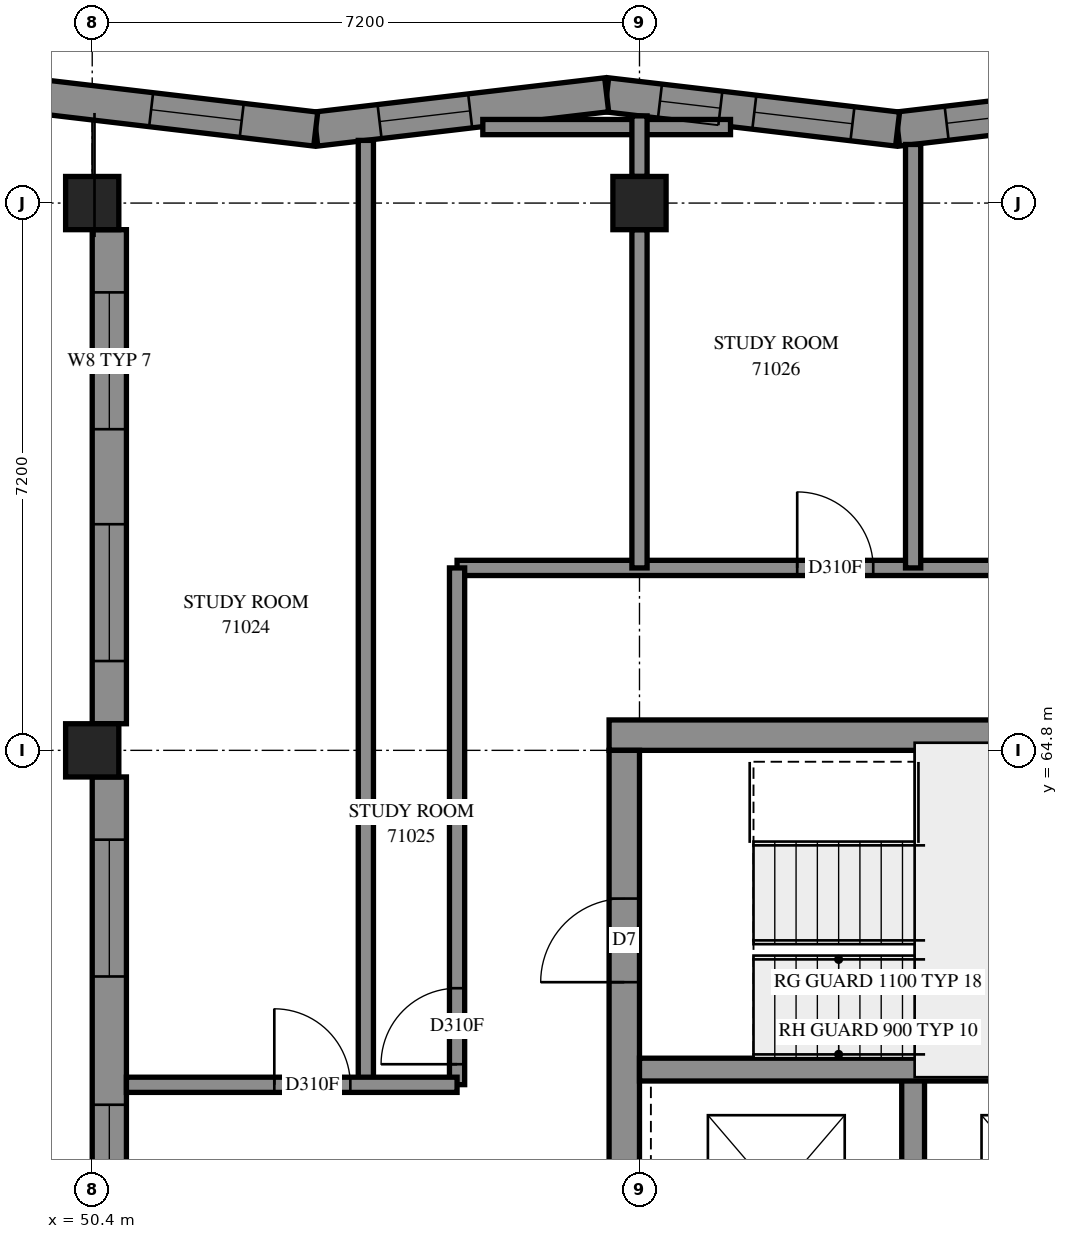
"""IFC4 building model, lengths in metres.
Left out: names, types, materials, properties, quantities, classifications, styles, units other than length and angle.
Written with IfcOpenShell. Run it as: python <this file> out.ifc"""

import sys

from ifc_helpers import new_model, si_unit, direction, frame, frame_2d, origin, origin_2d, place, context, subcontext, project, spatial, polyline, rectangle, outline, extrude, element, fill, save


model = new_model("IFC4")
c1 = context("Model", 3, precision=1e-05, world=origin(), true_north=direction((0.0, 1.0)))
c2 = subcontext(c1, "Body", "Model", "MODEL_VIEW")
j1 = project(units=[si_unit("LENGTHUNIT", "METRE"), si_unit("PLANEANGLEUNIT", "RADIAN")], contexts=[c1])
p1 = place(None, origin())
s1 = spatial("IfcSite", under=j1, at=p1, CompositionType="ELEMENT")
p2 = place(p1, origin())
s2 = spatial("IfcBuilding", under=s1, at=p2, CompositionType="ELEMENT")
p3 = place(p2, frame((0.0, 0.0, 260.8)))
s3 = spatial("IfcBuildingStorey", under=s2, at=p3, CompositionType="ELEMENT", Elevation=260.8)
for number, where, z_axis, x_axis in (
    (1, (50.4, 64.8, 0.0), (0.0, 0.0, 1.0), (1.0, 0.0, 0.0)),
    (2, (50.4, 72.0, 0.0), (0.0, 0.0, 1.0), (1.0, 0.0, 0.0)),
    (3, (57.6, 72.0, 0.0), (0.0, 0.0, 1.0), (1.0, 0.0, 0.0)),
):
    element("IfcColumn", number, at=place(p3, frame(where, z_axis=z_axis, x_axis=x_axis)), inside=s3, PredefinedType="COLUMN", context=c2, shape_type="SweptSolid", body=[
        extrude(rectangle(XDim=0.7, YDim=0.7, at=origin_2d()), origin(), (0.0, 0.0, 1.0), 3.1),
    ])
p4 = place(p3, frame((57.2, 65.0, -0.3), z_axis=(0.0, 0.0, 1.0), x_axis=(1.0, 0.0, 0.0)))
e4 = element("IfcWall", 4, at=p4, inside=s3, PredefinedType="SHEAR", context=c2, shape_type="SweptSolid", body=[
    extrude(rectangle(XDim=15.2, YDim=0.4, at=frame_2d((7.6, 0.0))), origin(), (0.0, 0.0, 1.0), 2.7),
])
p5 = place(p4, frame((10.4, 0.0, 0.3)))
e5 = element("IfcOpeningElement", 5, at=p5, cuts=e4, PredefinedType="OPENING", context=c2, shape_type="SweptSolid", body=[
    extrude(rectangle(XDim=0.8, YDim=2.1, at=frame_2d((0.4, 1.05))), frame((0.0, 0.21, 0.0), z_axis=(0.0, -1.0, 0.0), x_axis=(1.0, 0.0, 0.0)), (0.0, 0.0, 1.0), 0.42),
])
p6 = place(p3, frame((57.4, 50.4, -0.3), z_axis=(0.0, 0.0, 1.0), x_axis=(0.0, 1.0, 0.0)))
e6 = element("IfcWall", 6, at=p6, inside=s3, PredefinedType="SHEAR", context=c2, shape_type="SweptSolid", body=[
    extrude(rectangle(XDim=14.4, YDim=0.4, at=frame_2d((7.2, 0.0))), origin(), (0.0, 0.0, 1.0), 2.7),
])
p7 = place(p6, frame((4.55, 0.0, 0.3)))
e7 = element("IfcOpeningElement", 7, at=p7, cuts=e6, PredefinedType="OPENING", context=c2, shape_type="SweptSolid", body=[
    extrude(rectangle(XDim=1.1, YDim=2.1, at=frame_2d((0.55, 1.05))), frame((0.0, 0.21, 0.0), z_axis=(0.0, -1.0, 0.0), x_axis=(1.0, 0.0, 0.0)), (0.0, 0.0, 1.0), 0.42),
])
p8 = place(p6, frame((11.35, 0.0, 0.3)))
e8 = element("IfcOpeningElement", 8, at=p8, cuts=e6, PredefinedType="OPENING", context=c2, shape_type="SweptSolid", body=[
    extrude(rectangle(XDim=1.1, YDim=2.1, at=frame_2d((0.55, 1.05))), frame((0.0, 0.21, 0.0), z_axis=(0.0, -1.0, 0.0), x_axis=(1.0, 0.0, 0.0)), (0.0, 0.0, 1.0), 0.42),
])
p9 = place(p3, frame((61.2, 57.3, 0.0), z_axis=(0.0, 0.0, 1.0), x_axis=(0.0, 1.0, 0.0)))
e9 = element("IfcWall", 9, at=p9, inside=s3, PredefinedType="SOLIDWALL", context=c2, shape_type="SweptSolid", body=[
    extrude(rectangle(XDim=3.3, YDim=0.3, at=frame_2d((1.65, 0.0))), origin(), (0.0, 0.0, 1.0), 3.1),
])
p10 = place(p3, frame((57.6, 60.6, 0.0), z_axis=(0.0, 0.0, 1.0), x_axis=(1.0, 0.0, 0.0)))
e10 = element("IfcWall", 10, at=p10, inside=s3, PredefinedType="SOLIDWALL", context=c2, shape_type="SweptSolid", body=[
    extrude(rectangle(XDim=7.2, YDim=0.3, at=frame_2d((3.6, 0.0))), origin(), (0.0, 0.0, 1.0), 3.1),
])
p11 = place(p3, frame((64.823, 73.424, 0.0), z_axis=(0.0, 0.0, 1.0), x_axis=(-0.9931289789, -0.1170249176, 0.0)))
e11 = element("IfcWall", 11, at=p11, inside=s3, PredefinedType="SOLIDWALL", context=c2, shape_type="SweptSolid", body=[
    extrude(outline(polyline([(-0.026, -0.225), (3.827, -0.225), (3.88, 0.225), (0.026, 0.225), (-0.026, -0.225)])), origin(), (0.0, 0.0, 1.0), 3.1),
])
p12 = place(p11, frame((0.554, 0.0, 0.45)))
e12 = element("IfcOpeningElement", 12, at=p12, cuts=e11, PredefinedType="OPENING", context=c2, shape_type="SweptSolid", body=[
    extrude(rectangle(XDim=1.0, YDim=2.5, at=frame_2d((0.5, 1.25))), frame((0.0, 0.235, 0.0), z_axis=(0.0, -1.0, 0.0), x_axis=(1.0, 0.0, 0.0)), (0.0, 0.0, 1.0), 0.47),
])
p13 = place(p11, frame((1.904, 0.0, 0.45)))
e13 = element("IfcOpeningElement", 13, at=p13, cuts=e11, PredefinedType="OPENING", context=c2, shape_type="SweptSolid", body=[
    extrude(rectangle(XDim=1.3, YDim=2.5, at=frame_2d((0.65, 1.25))), frame((0.0, 0.235, 0.0), z_axis=(0.0, -1.0, 0.0), x_axis=(1.0, 0.0, 0.0)), (0.0, 0.0, 1.0), 0.47),
])
p14 = place(p3, frame((60.995, 72.973, 0.0), z_axis=(0.0, 0.0, 1.0), x_axis=(-0.9931289789, 0.1170249176, 0.0)))
e14 = element("IfcWall", 14, at=p14, inside=s3, PredefinedType="SOLIDWALL", context=c2, shape_type="SweptSolid", body=[
    extrude(outline(polyline([(0.026, -0.225), (3.88, -0.225), (3.827, 0.225), (-0.026, 0.225), (0.026, -0.225)])), origin(), (0.0, 0.0, 1.0), 3.1),
])
p15 = place(p14, frame((0.598, 0.0, 0.45)))
e15 = element("IfcOpeningElement", 15, at=p15, cuts=e14, PredefinedType="OPENING", context=c2, shape_type="SweptSolid", body=[
    extrude(rectangle(XDim=1.3, YDim=2.5, at=frame_2d((0.65, 1.25))), frame((0.0, 0.235, 0.0), z_axis=(0.0, -1.0, 0.0), x_axis=(1.0, 0.0, 0.0)), (0.0, 0.0, 1.0), 0.47),
])
p16 = place(p14, frame((2.348, 0.0, 0.45)))
e16 = element("IfcOpeningElement", 16, at=p16, cuts=e14, PredefinedType="OPENING", context=c2, shape_type="SweptSolid", body=[
    extrude(rectangle(XDim=0.8, YDim=2.5, at=frame_2d((0.4, 1.25))), frame((0.0, 0.235, 0.0), z_axis=(0.0, -1.0, 0.0), x_axis=(1.0, 0.0, 0.0)), (0.0, 0.0, 1.0), 0.47),
])
p17 = place(p3, frame((57.168, 73.424, 0.0), z_axis=(0.0, 0.0, 1.0), x_axis=(-0.9931289789, -0.1170249176, 0.0)))
e17 = element("IfcWall", 17, at=p17, inside=s3, PredefinedType="SOLIDWALL", context=c2, shape_type="SweptSolid", body=[
    extrude(outline(polyline([(-0.026, -0.225), (3.827, -0.225), (3.88, 0.225), (0.026, 0.225), (-0.026, -0.225)])), origin(), (0.0, 0.0, 1.0), 3.1),
])
p18 = place(p17, frame((1.808, 0.0, 0.45)))
e18 = element("IfcOpeningElement", 18, at=p18, cuts=e17, PredefinedType="OPENING", context=c2, shape_type="SweptSolid", body=[
    extrude(rectangle(XDim=1.2, YDim=2.55, at=frame_2d((0.6, 1.275))), frame((0.0, 0.235, 0.0), z_axis=(0.0, -1.0, 0.0), x_axis=(1.0, 0.0, 0.0)), (0.0, 0.0, 1.0), 0.47),
])
p19 = place(p3, frame((53.341, 72.973, 0.0), z_axis=(0.0, 0.0, 1.0), x_axis=(-0.9931289789, 0.1170249176, 0.0)))
e19 = element("IfcWall", 19, at=p19, inside=s3, PredefinedType="SOLIDWALL", context=c2, shape_type="SweptSolid", body=[
    extrude(outline(polyline([(0.026, -0.225), (3.88, -0.225), (3.827, 0.225), (-0.026, 0.225), (0.026, -0.225)])), origin(), (0.0, 0.0, 1.0), 3.1),
])
p20 = place(p19, frame((0.981, 0.0, 0.45)))
e20 = element("IfcOpeningElement", 20, at=p20, cuts=e19, PredefinedType="OPENING", context=c2, shape_type="SweptSolid", body=[
    extrude(rectangle(XDim=1.2, YDim=2.55, at=frame_2d((0.6, 1.275))), frame((0.0, 0.235, 0.0), z_axis=(0.0, -1.0, 0.0), x_axis=(1.0, 0.0, 0.0)), (0.0, 0.0, 1.0), 0.47),
])
p21 = place(p3, frame((50.625, 71.65, 0.0), z_axis=(0.0, 0.0, 1.0), x_axis=(0.0, -1.0, 0.0)))
e21 = element("IfcWall", 21, at=p21, inside=s3, PredefinedType="SOLIDWALL", context=c2, shape_type="SweptSolid", body=[
    extrude(rectangle(XDim=6.5, YDim=0.45, at=frame_2d((3.25, 0.0))), origin(), (0.0, 0.0, 1.0), 3.1),
])
p22 = place(p21, frame((0.825, 0.0, 0.7)))
e22 = element("IfcOpeningElement", 22, at=p22, cuts=e21, PredefinedType="OPENING", context=c2, shape_type="SweptSolid", body=[
    extrude(rectangle(XDim=1.8, YDim=1.8, at=frame_2d((0.9, 0.9))), frame((0.0, 0.235, 0.0), z_axis=(0.0, -1.0, 0.0), x_axis=(1.0, 0.0, 0.0)), (0.0, 0.0, 1.0), 0.47),
])
p23 = place(p21, frame((3.875, 0.0, 0.7)))
e23 = element("IfcOpeningElement", 23, at=p23, cuts=e21, PredefinedType="OPENING", context=c2, shape_type="SweptSolid", body=[
    extrude(rectangle(XDim=1.8, YDim=1.8, at=frame_2d((0.9, 0.9))), frame((0.0, 0.235, 0.0), z_axis=(0.0, -1.0, 0.0), x_axis=(1.0, 0.0, 0.0)), (0.0, 0.0, 1.0), 0.47),
])
p24 = place(p3, frame((50.625, 64.45, 0.0), z_axis=(0.0, 0.0, 1.0), x_axis=(0.0, -1.0, 0.0)))
e24 = element("IfcWall", 24, at=p24, inside=s3, PredefinedType="SOLIDWALL", context=c2, shape_type="SweptSolid", body=[
    extrude(rectangle(XDim=6.5, YDim=0.45, at=frame_2d((3.25, 0.0))), origin(), (0.0, 0.0, 1.0), 3.1),
])
p25 = place(p24, frame((0.825, 0.0, 0.7)))
e25 = element("IfcOpeningElement", 25, at=p25, cuts=e24, PredefinedType="OPENING", context=c2, shape_type="SweptSolid", body=[
    extrude(rectangle(XDim=1.8, YDim=1.8, at=frame_2d((0.9, 0.9))), frame((0.0, 0.235, 0.0), z_axis=(0.0, -1.0, 0.0), x_axis=(1.0, 0.0, 0.0)), (0.0, 0.0, 1.0), 0.47),
])
p26 = place(p24, frame((4.312, 0.0, 0.6)))
e26 = element("IfcOpeningElement", 26, at=p26, cuts=e24, PredefinedType="OPENING", context=c2, shape_type="SweptSolid", body=[
    extrude(rectangle(XDim=1.2, YDim=1.9, at=frame_2d((0.6, 0.95))), frame((0.0, 0.235, 0.0), z_axis=(0.0, -1.0, 0.0), x_axis=(1.0, 0.0, 0.0)), (0.0, 0.0, 1.0), 0.47),
])
p27 = place(p3, frame((55.2, 67.2, 0.0), z_axis=(0.0, 0.0, 1.0), x_axis=(1.0, 0.0, 0.0)))
e27 = element("IfcWall", 27, at=p27, inside=s3, PredefinedType="PARTITIONING", context=c2, shape_type="SweptSolid", body=[
    extrude(rectangle(XDim=19.2, YDim=0.2, at=frame_2d((9.6, 0.0))), origin(), (0.0, 0.0, 1.0), 3.1),
])
p28 = place(p27, frame((4.475, 0.0, 0.0)))
e28 = element("IfcOpeningElement", 28, at=p28, cuts=e27, PredefinedType="OPENING", context=c2, shape_type="SweptSolid", body=[
    extrude(rectangle(XDim=1.0, YDim=2.1, at=frame_2d((0.5, 1.05))), frame((0.0, 0.11, 0.0), z_axis=(0.0, -1.0, 0.0), x_axis=(1.0, 0.0, 0.0)), (0.0, 0.0, 1.0), 0.22),
])
p29 = place(p27, frame((8.301, 0.0, 0.0)))
e29 = element("IfcOpeningElement", 29, at=p29, cuts=e27, PredefinedType="OPENING", context=c2, shape_type="SweptSolid", body=[
    extrude(rectangle(XDim=0.9, YDim=2.1, at=frame_2d((0.45, 1.05))), frame((0.0, 0.11, 0.0), z_axis=(0.0, -1.0, 0.0), x_axis=(1.0, 0.0, 0.0)), (0.0, 0.0, 1.0), 0.22),
])
p30 = place(p27, frame((13.88, 0.0, 0.0)))
e30 = element("IfcOpeningElement", 30, at=p30, cuts=e27, PredefinedType="OPENING", context=c2, shape_type="SweptSolid", body=[
    extrude(rectangle(XDim=1.0, YDim=2.1, at=frame_2d((0.5, 1.05))), frame((0.0, 0.11, 0.0), z_axis=(0.0, -1.0, 0.0), x_axis=(1.0, 0.0, 0.0)), (0.0, 0.0, 1.0), 0.22),
])
p31 = place(p3, frame((54.0, 60.4, 0.0), z_axis=(0.0, 0.0, 1.0), x_axis=(0.0, 1.0, 0.0)))
e31 = element("IfcWall", 31, at=p31, inside=s3, PredefinedType="PARTITIONING", context=c2, shape_type="SweptSolid", body=[
    extrude(rectangle(XDim=12.425, YDim=0.2, at=frame_2d((6.212, 0.0))), origin(), (0.0, 0.0, 1.0), 3.1),
])
p32 = place(p3, frame((55.2, 60.402, 0.0), z_axis=(0.0, 0.0, 1.0), x_axis=(0.0, 1.0, 0.0)))
e32 = element("IfcWall", 32, at=p32, inside=s3, PredefinedType="PARTITIONING", context=c2, shape_type="SweptSolid", body=[
    extrude(rectangle(XDim=6.798, YDim=0.2, at=frame_2d((3.399, 0.0))), origin(), (0.0, 0.0, 1.0), 3.1),
])
p33 = place(p32, frame((0.269, 0.0, 0.0)))
e33 = element("IfcOpeningElement", 33, at=p33, cuts=e32, PredefinedType="OPENING", context=c2, shape_type="SweptSolid", body=[
    extrude(rectangle(XDim=1.0, YDim=2.1, at=frame_2d((0.5, 1.05))), frame((0.0, 0.11, 0.0), z_axis=(0.0, -1.0, 0.0), x_axis=(1.0, 0.0, 0.0)), (0.0, 0.0, 1.0), 0.22),
])
p34 = place(p3, frame((61.2, 67.2, 0.0), z_axis=(0.0, 0.0, 1.0), x_axis=(0.0, 1.0, 0.0)))
e34 = element("IfcWall", 34, at=p34, inside=s3, PredefinedType="PARTITIONING", context=c2, shape_type="SweptSolid", body=[
    extrude(rectangle(XDim=5.571, YDim=0.2, at=frame_2d((2.785, 0.0))), origin(), (0.0, 0.0, 1.0), 3.1),
])
p35 = place(p3, frame((57.6, 67.2, 0.0), z_axis=(0.0, 0.0, 1.0), x_axis=(0.0, 1.0, 0.0)))
e35 = element("IfcWall", 35, at=p35, inside=s3, PredefinedType="PARTITIONING", context=c2, shape_type="SweptSolid", body=[
    extrude(rectangle(XDim=4.45, YDim=0.2, at=frame_2d((2.225, 0.0))), origin(), (0.0, 0.0, 1.0), 3.1),
])
p36 = place(p3, frame((50.85, 60.4, 0.0), z_axis=(0.0, 0.0, 1.0), x_axis=(1.0, 0.0, 0.0)))
e36 = element("IfcWall", 36, at=p36, inside=s3, PredefinedType="PARTITIONING", context=c2, shape_type="SweptSolid", body=[
    extrude(rectangle(XDim=4.35, YDim=0.2, at=frame_2d((2.175, 0.0))), origin(), (0.0, 0.0, 1.0), 3.1),
])
p37 = place(p36, frame((1.946, 0.0, 0.0)))
e37 = element("IfcOpeningElement", 37, at=p37, cuts=e36, PredefinedType="OPENING", context=c2, shape_type="SweptSolid", body=[
    extrude(rectangle(XDim=1.0, YDim=2.1, at=frame_2d((0.5, 1.05))), frame((0.0, 0.11, 0.0), z_axis=(0.0, -1.0, 0.0), x_axis=(1.0, 0.0, 0.0)), (0.0, 0.0, 1.0), 0.22),
])
p38 = place(p3, frame((55.539, 73.0, 0.0), z_axis=(0.0, 0.0, 1.0), x_axis=(1.0, 0.0, 0.0)))
e38 = element("IfcWall", 38, at=p38, inside=s3, PredefinedType="PARTITIONING", context=c2, shape_type="SweptSolid", body=[
    extrude(rectangle(XDim=3.259, YDim=0.2, at=frame_2d((1.629, 0.0))), origin(), (0.0, 0.0, 1.0), 3.1),
])
p39 = place(p3, frame((57.6, 72.35, 0.0), z_axis=(0.0, 0.0, 1.0), x_axis=(0.0, 1.0, 0.0)))
e39 = element("IfcWall", 39, at=p39, inside=s3, PredefinedType="PARTITIONING", context=c2, shape_type="SweptSolid", body=[
    extrude(rectangle(XDim=0.797, YDim=0.2, at=frame_2d((0.399, 0.0))), origin(), (0.0, 0.0, 1.0), 3.1),
])
p40 = place(p18, origin())
e40 = element("IfcWindow", 40, at=p40, inside=s3, PartitioningType="SINGLE_PANEL", PredefinedType="WINDOW", context=c2, shape_type="SweptSolid", body=[
    extrude(rectangle(XDim=1.2, YDim=2.55, at=frame_2d((0.6, 1.275))), frame((0.0, 0.205, 0.0), z_axis=(0.0, -1.0, 0.0), x_axis=(1.0, 0.0, 0.0)), (0.0, 0.0, 1.0), 0.06),
])
fill(e18, e40)
p41 = place(p20, origin())
e41 = element("IfcWindow", 41, at=p41, inside=s3, PartitioningType="SINGLE_PANEL", PredefinedType="WINDOW", context=c2, shape_type="SweptSolid", body=[
    extrude(rectangle(XDim=1.2, YDim=2.55, at=frame_2d((0.6, 1.275))), frame((0.0, 0.205, 0.0), z_axis=(0.0, -1.0, 0.0), x_axis=(1.0, 0.0, 0.0)), (0.0, 0.0, 1.0), 0.06),
])
fill(e20, e41)
p42 = place(p22, origin())
e42 = element("IfcWindow", 42, at=p42, inside=s3, PartitioningType="SINGLE_PANEL", PredefinedType="WINDOW", context=c2, shape_type="SweptSolid", body=[
    extrude(rectangle(XDim=1.8, YDim=1.8, at=frame_2d((0.9, 0.9))), frame((0.0, 0.205, 0.0), z_axis=(0.0, -1.0, 0.0), x_axis=(1.0, 0.0, 0.0)), (0.0, 0.0, 1.0), 0.06),
])
fill(e22, e42)
p43 = place(p23, origin())
e43 = element("IfcWindow", 43, at=p43, inside=s3, PartitioningType="SINGLE_PANEL", PredefinedType="WINDOW", context=c2, shape_type="SweptSolid", body=[
    extrude(rectangle(XDim=1.8, YDim=1.8, at=frame_2d((0.9, 0.9))), frame((0.0, 0.205, 0.0), z_axis=(0.0, -1.0, 0.0), x_axis=(1.0, 0.0, 0.0)), (0.0, 0.0, 1.0), 0.06),
])
fill(e23, e43)
p44 = place(p25, origin())
e44 = element("IfcWindow", 44, at=p44, inside=s3, PartitioningType="SINGLE_PANEL", PredefinedType="WINDOW", context=c2, shape_type="SweptSolid", body=[
    extrude(rectangle(XDim=1.8, YDim=1.8, at=frame_2d((0.9, 0.9))), frame((0.0, 0.205, 0.0), z_axis=(0.0, -1.0, 0.0), x_axis=(1.0, 0.0, 0.0)), (0.0, 0.0, 1.0), 0.06),
])
fill(e25, e44)
p45 = place(p8, origin())
e45 = element("IfcDoor", 45, at=p45, inside=s3, OperationType="SINGLE_SWING_LEFT", PredefinedType="DOOR", context=c2, shape_type="SweptSolid", body=[
    extrude(rectangle(XDim=1.1, YDim=2.1, at=frame_2d((0.55, 1.05))), frame((0.0, 0.025, 0.0), z_axis=(0.0, -1.0, 0.0), x_axis=(1.0, 0.0, 0.0)), (0.0, 0.0, 1.0), 0.05),
])
fill(e8, e45)
p46 = place(p37, origin())
e46 = element("IfcDoor", 46, at=p46, inside=s3, OperationType="SINGLE_SWING_RIGHT", PredefinedType="DOOR", context=c2, shape_type="SweptSolid", body=[
    extrude(rectangle(XDim=1.0, YDim=2.1, at=frame_2d((0.5, 1.05))), frame((0.0, 0.025, 0.0), z_axis=(0.0, -1.0, 0.0), x_axis=(1.0, 0.0, 0.0)), (0.0, 0.0, 1.0), 0.05),
])
fill(e37, e46)
p47 = place(p33, origin())
e47 = element("IfcDoor", 47, at=p47, inside=s3, OperationType="SINGLE_SWING_LEFT", PredefinedType="DOOR", context=c2, shape_type="SweptSolid", body=[
    extrude(rectangle(XDim=1.0, YDim=2.1, at=frame_2d((0.5, 1.05))), frame((0.0, 0.025, 0.0), z_axis=(0.0, -1.0, 0.0), x_axis=(1.0, 0.0, 0.0)), (0.0, 0.0, 1.0), 0.05),
])
fill(e33, e47)
p48 = place(p28, origin())
e48 = element("IfcDoor", 48, at=p48, inside=s3, OperationType="SINGLE_SWING_RIGHT", PredefinedType="DOOR", context=c2, shape_type="SweptSolid", body=[
    extrude(rectangle(XDim=1.0, YDim=2.1, at=frame_2d((0.5, 1.05))), frame((0.0, 0.025, 0.0), z_axis=(0.0, -1.0, 0.0), x_axis=(1.0, 0.0, 0.0)), (0.0, 0.0, 1.0), 0.05),
])
fill(e28, e48)
p49 = place(p13, origin())
e49 = element("IfcWindow", 49, at=p49, inside=s3, PartitioningType="SINGLE_PANEL", PredefinedType="WINDOW", context=c2, shape_type="SweptSolid", body=[
    extrude(rectangle(XDim=1.3, YDim=2.5, at=frame_2d((0.65, 1.25))), frame((0.0, 0.205, 0.0), z_axis=(0.0, -1.0, 0.0), x_axis=(1.0, 0.0, 0.0)), (0.0, 0.0, 1.0), 0.06),
])
fill(e13, e49)
p50 = place(p15, origin())
e50 = element("IfcWindow", 50, at=p50, inside=s3, PartitioningType="SINGLE_PANEL", PredefinedType="WINDOW", context=c2, shape_type="SweptSolid", body=[
    extrude(rectangle(XDim=1.3, YDim=2.5, at=frame_2d((0.65, 1.25))), frame((0.0, 0.205, 0.0), z_axis=(0.0, -1.0, 0.0), x_axis=(1.0, 0.0, 0.0)), (0.0, 0.0, 1.0), 0.06),
])
fill(e15, e50)
p51 = place(p16, origin())
e51 = element("IfcWindow", 51, at=p51, inside=s3, PartitioningType="SINGLE_PANEL", PredefinedType="WINDOW", context=c2, shape_type="SweptSolid", body=[
    extrude(rectangle(XDim=0.8, YDim=2.5, at=frame_2d((0.4, 1.25))), frame((0.0, 0.115, 0.0), z_axis=(0.0, -1.0, 0.0), x_axis=(1.0, 0.0, 0.0)), (0.0, 0.0, 1.0), 0.06),
])
fill(e16, e51)
p52 = place(p26, origin())
e52 = element("IfcWindow", 52, at=p52, inside=s3, PartitioningType="SINGLE_PANEL", PredefinedType="WINDOW", context=c2, shape_type="SweptSolid", body=[
    extrude(rectangle(XDim=1.2, YDim=1.9, at=frame_2d((0.6, 0.95))), frame((0.0, 0.205, 0.0), z_axis=(0.0, -1.0, 0.0), x_axis=(1.0, 0.0, 0.0)), (0.0, 0.0, 1.0), 0.06),
])
fill(e26, e52)
save(model, sys.argv[1])
